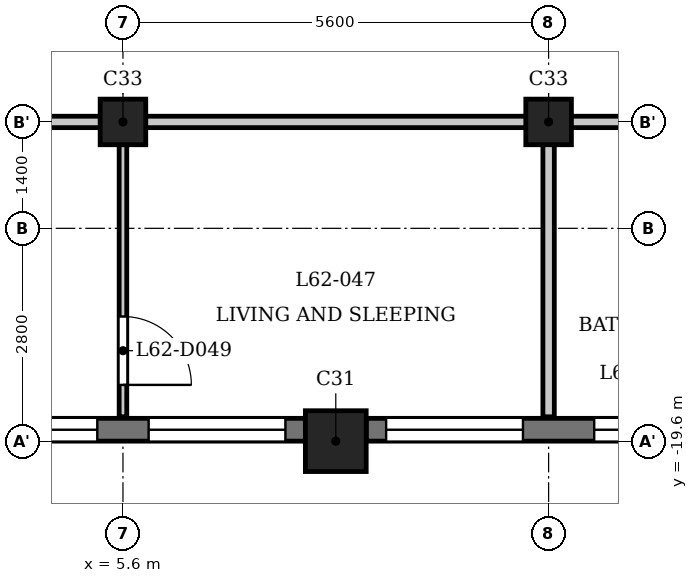
"""IFC4 building model, lengths in metres.
Left out: names, types, materials, properties, quantities, classifications, styles, units other than length and angle.
Written with IfcOpenShell. Run it as: python <this file> out.ifc"""

import sys

from ifc_helpers import new_model, si_unit, direction, frame, frame_2d, origin, origin_2d, place, context, subcontext, project, spatial, rectangle, extrude, element, fill, save


model = new_model("IFC4")
c1 = context("Model", 3, precision=1e-05, world=origin(), true_north=direction((0.0, 1.0)))
c2 = subcontext(c1, "Body", "Model", "MODEL_VIEW")
j1 = project(units=[si_unit("LENGTHUNIT", "METRE"), si_unit("PLANEANGLEUNIT", "RADIAN")], contexts=[c1])
p1 = place(None, origin())
s1 = spatial("IfcSite", under=j1, at=p1, CompositionType="ELEMENT")
p2 = place(p1, origin())
s2 = spatial("IfcBuilding", under=s1, at=p2, CompositionType="ELEMENT")
p3 = place(p2, frame((0.0, 0.0, 241.7)))
s3 = spatial("IfcBuildingStorey", under=s2, at=p3, CompositionType="ELEMENT", Elevation=241.7)
p4 = place(p3, frame((8.4, -19.6, 0.0), z_axis=(0.0, 0.0, 1.0), x_axis=(1.0, 0.0, 0.0)))
e1 = element("IfcColumn", 1, at=p4, inside=s3, PredefinedType="COLUMN", context=c2, shape_type="SweptSolid", body=[
    extrude(rectangle(XDim=0.8, YDim=0.8, at=origin_2d()), origin(), (0.0, 0.0, 1.0), 3.5),
])
for number, where, z_axis, x_axis in (
    (2, (5.6, -15.4, 0.0), (0.0, 0.0, 1.0), (1.0, 0.0, 0.0)),
    (3, (11.2, -15.4, 0.0), (0.0, 0.0, 1.0), (1.0, 0.0, 0.0)),
):
    element("IfcColumn", number, at=place(p3, frame(where, z_axis=z_axis, x_axis=x_axis)), inside=s3, PredefinedType="COLUMN", context=c2, shape_type="SweptSolid", body=[
        extrude(rectangle(XDim=0.6, YDim=0.6, at=origin_2d()), origin(), (0.0, 0.0, 1.0), 3.5),
    ])
p5 = place(p3, frame((3.2, -19.45, 0.0), z_axis=(0.0, 0.0, 1.0), x_axis=(1.0, 0.0, 0.0)))
e4 = element("IfcWall", 4, at=p5, inside=s3, PredefinedType="SOLIDWALL", context=c2, shape_type="SweptSolid", body=[
    extrude(rectangle(XDim=4.8, YDim=0.3, at=frame_2d((2.4, 0.0))), origin(), (0.0, 0.0, 1.0), 2.55),
])
p6 = place(p5, frame((0.262, 0.0, 0.9)))
e5 = element("IfcOpeningElement", 5, at=p6, cuts=e4, PredefinedType="OPENING", context=c2, shape_type="SweptSolid", body=[
    extrude(rectangle(XDim=1.8, YDim=1.25, at=frame_2d((0.9, 0.625))), frame((0.0, 0.16, 0.0), z_axis=(0.0, -1.0, 0.0), x_axis=(1.0, 0.0, 0.0)), (0.0, 0.0, 1.0), 0.32),
])
p7 = place(p5, frame((2.738, 0.0, 0.9)))
e6 = element("IfcOpeningElement", 6, at=p7, cuts=e4, PredefinedType="OPENING", context=c2, shape_type="SweptSolid", body=[
    extrude(rectangle(XDim=1.8, YDim=1.25, at=frame_2d((0.9, 0.625))), frame((0.0, 0.16, 0.0), z_axis=(0.0, -1.0, 0.0), x_axis=(1.0, 0.0, 0.0)), (0.0, 0.0, 1.0), 0.32),
])
p8 = place(p3, frame((8.8, -19.45, 0.0), z_axis=(0.0, 0.0, 1.0), x_axis=(1.0, 0.0, 0.0)))
e7 = element("IfcWall", 7, at=p8, inside=s3, PredefinedType="SOLIDWALL", context=c2, shape_type="SweptSolid", body=[
    extrude(rectangle(XDim=4.8, YDim=0.3, at=frame_2d((2.4, 0.0))), origin(), (0.0, 0.0, 1.0), 2.55),
])
p9 = place(p8, frame((0.262, 0.0, 0.9)))
e8 = element("IfcOpeningElement", 8, at=p9, cuts=e7, PredefinedType="OPENING", context=c2, shape_type="SweptSolid", body=[
    extrude(rectangle(XDim=1.8, YDim=1.25, at=frame_2d((0.9, 0.625))), frame((0.0, 0.16, 0.0), z_axis=(0.0, -1.0, 0.0), x_axis=(1.0, 0.0, 0.0)), (0.0, 0.0, 1.0), 0.32),
])
p10 = place(p8, frame((3.0, 0.0, 0.6)))
e9 = element("IfcOpeningElement", 9, at=p10, cuts=e7, PredefinedType="OPENING", context=c2, shape_type="SweptSolid", body=[
    extrude(rectangle(XDim=1.2, YDim=1.55, at=frame_2d((0.6, 0.775))), frame((0.0, 0.16, 0.0), z_axis=(0.0, -1.0, 0.0), x_axis=(1.0, 0.0, 0.0)), (0.0, 0.0, 1.0), 0.32),
])
p11 = place(p3, frame((-23.322, -15.4, 0.0), z_axis=(0.0, 0.0, 1.0), x_axis=(1.0, 0.0, 0.0)))
e10 = element("IfcWall", 10, at=p11, inside=s3, PredefinedType="PARTITIONING", context=c2, shape_type="SweptSolid", body=[
    extrude(rectangle(XDim=46.872, YDim=0.15, at=frame_2d((23.436, 0.0))), origin(), (0.0, 0.0, 1.0), 3.2),
])
p12 = place(p11, frame((7.172, 0.0, 0.0)))
e11 = element("IfcOpeningElement", 11, at=p12, cuts=e10, PredefinedType="OPENING", context=c2, shape_type="SweptSolid", body=[
    extrude(rectangle(XDim=1.0, YDim=2.1, at=frame_2d((0.5, 1.05))), frame((0.0, 0.085, 0.0), z_axis=(0.0, -1.0, 0.0), x_axis=(1.0, 0.0, 0.0)), (0.0, 0.0, 1.0), 0.17),
])
p13 = place(p11, frame((16.172, 0.0, 0.0)))
e12 = element("IfcOpeningElement", 12, at=p13, cuts=e10, PredefinedType="OPENING", context=c2, shape_type="SweptSolid", body=[
    extrude(rectangle(XDim=1.0, YDim=2.1, at=frame_2d((0.5, 1.05))), frame((0.0, 0.085, 0.0), z_axis=(0.0, -1.0, 0.0), x_axis=(1.0, 0.0, 0.0)), (0.0, 0.0, 1.0), 0.17),
])
p14 = place(p11, frame((26.372, 0.0, 0.0)))
e13 = element("IfcOpeningElement", 13, at=p14, cuts=e10, PredefinedType="OPENING", context=c2, shape_type="SweptSolid", body=[
    extrude(rectangle(XDim=1.0, YDim=2.1, at=frame_2d((0.5, 1.05))), frame((0.0, 0.085, 0.0), z_axis=(0.0, -1.0, 0.0), x_axis=(1.0, 0.0, 0.0)), (0.0, 0.0, 1.0), 0.17),
])
p15 = place(p11, frame((38.572, 0.0, 0.0)))
e14 = element("IfcOpeningElement", 14, at=p15, cuts=e10, PredefinedType="OPENING", context=c2, shape_type="SweptSolid", body=[
    extrude(rectangle(XDim=1.0, YDim=2.1, at=frame_2d((0.5, 1.05))), frame((0.0, 0.085, 0.0), z_axis=(0.0, -1.0, 0.0), x_axis=(1.0, 0.0, 0.0)), (0.0, 0.0, 1.0), 0.17),
])
p16 = place(p3, frame((5.6, -19.28, 0.0), z_axis=(0.0, 0.0, 1.0), x_axis=(0.0, 1.0, 0.0)))
e15 = element("IfcWall", 15, at=p16, inside=s3, PredefinedType="PARTITIONING", context=c2, shape_type="SweptSolid", body=[
    extrude(rectangle(XDim=3.805, YDim=0.1, at=frame_2d((1.902, 0.0))), origin(), (0.0, 0.0, 1.0), 3.2),
])
p17 = place(p16, frame((0.42, 0.0, 0.0)))
e16 = element("IfcOpeningElement", 16, at=p17, cuts=e15, PredefinedType="OPENING", context=c2, shape_type="SweptSolid", body=[
    extrude(rectangle(XDim=0.9, YDim=2.1, at=frame_2d((0.45, 1.05))), frame((0.0, 0.06, 0.0), z_axis=(0.0, -1.0, 0.0), x_axis=(1.0, 0.0, 0.0)), (0.0, 0.0, 1.0), 0.12),
])
p18 = place(p3, frame((11.2, -19.28, 0.0), z_axis=(0.0, 0.0, 1.0), x_axis=(0.0, 1.0, 0.0)))
e17 = element("IfcWall", 17, at=p18, inside=s3, PredefinedType="PARTITIONING", context=c2, shape_type="SweptSolid", body=[
    extrude(rectangle(XDim=3.805, YDim=0.15, at=frame_2d((1.902, 0.0))), origin(), (0.0, 0.0, 1.0), 3.2),
])
p19 = place(p17, origin())
e18 = element("IfcDoor", 18, at=p19, inside=s3, OperationType="SINGLE_SWING_LEFT", PredefinedType="DOOR", context=c2, shape_type="SweptSolid", body=[
    extrude(rectangle(XDim=0.9, YDim=2.1, at=frame_2d((0.45, 1.05))), frame((0.0, 0.025, 0.0), z_axis=(0.0, -1.0, 0.0), x_axis=(1.0, 0.0, 0.0)), (0.0, 0.0, 1.0), 0.05),
])
fill(e16, e18)
p20 = place(p6, origin())
e19 = element("IfcWindow", 19, at=p20, inside=s3, PartitioningType="SINGLE_PANEL", PredefinedType="WINDOW", context=c2, shape_type="SweptSolid", body=[
    extrude(rectangle(XDim=1.8, YDim=1.25, at=frame_2d((0.9, 0.625))), frame((0.0, 0.03, 0.0), z_axis=(0.0, -1.0, 0.0), x_axis=(1.0, 0.0, 0.0)), (0.0, 0.0, 1.0), 0.06),
])
fill(e5, e19)
p21 = place(p7, origin())
e20 = element("IfcWindow", 20, at=p21, inside=s3, PartitioningType="SINGLE_PANEL", PredefinedType="WINDOW", context=c2, shape_type="SweptSolid", body=[
    extrude(rectangle(XDim=1.8, YDim=1.25, at=frame_2d((0.9, 0.625))), frame((0.0, 0.03, 0.0), z_axis=(0.0, -1.0, 0.0), x_axis=(1.0, 0.0, 0.0)), (0.0, 0.0, 1.0), 0.06),
])
fill(e6, e20)
p22 = place(p9, origin())
e21 = element("IfcWindow", 21, at=p22, inside=s3, PartitioningType="SINGLE_PANEL", PredefinedType="WINDOW", context=c2, shape_type="SweptSolid", body=[
    extrude(rectangle(XDim=1.8, YDim=1.25, at=frame_2d((0.9, 0.625))), frame((0.0, 0.03, 0.0), z_axis=(0.0, -1.0, 0.0), x_axis=(1.0, 0.0, 0.0)), (0.0, 0.0, 1.0), 0.06),
])
fill(e8, e21)
p23 = place(p10, origin())
e22 = element("IfcWindow", 22, at=p23, inside=s3, PartitioningType="SINGLE_PANEL", PredefinedType="WINDOW", context=c2, shape_type="SweptSolid", body=[
    extrude(rectangle(XDim=1.2, YDim=1.55, at=frame_2d((0.6, 0.775))), frame((0.0, 0.03, 0.0), z_axis=(0.0, -1.0, 0.0), x_axis=(1.0, 0.0, 0.0)), (0.0, 0.0, 1.0), 0.06),
])
fill(e9, e22)
save(model, sys.argv[1])
